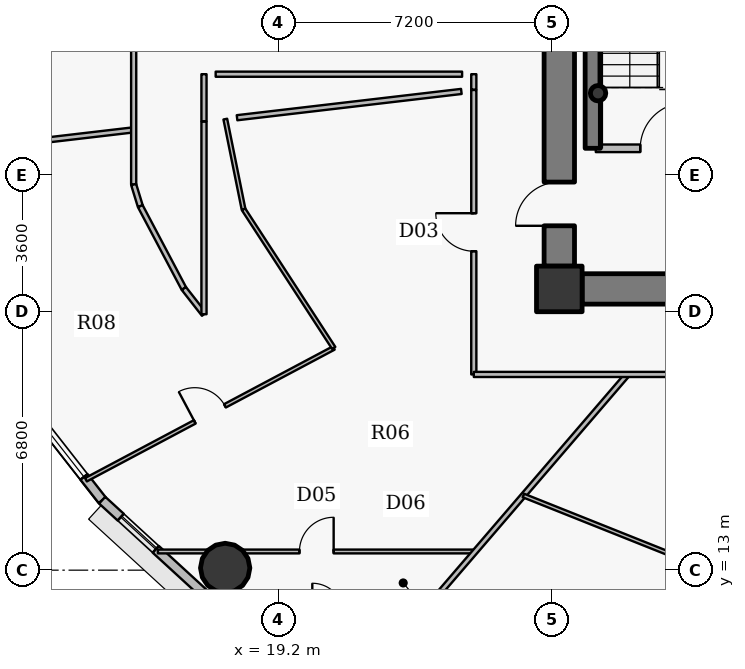
"""IFC4 building model, lengths in metres.
Left out: names, types, materials, properties, quantities, classifications, styles, units other than length and angle.
Written with IfcOpenShell. Run it as: python <this file> out.ifc"""

import sys

from ifc_helpers import new_model, si_unit, direction, frame, frame_2d, origin, origin_2d, place, context, subcontext, project, spatial, rectangle, hollow_circle, extrude, source, transform, mapped, element, fill, save


model = new_model("IFC4")
c1 = context("Model", 3, precision=1e-05, world=origin(), true_north=direction((0.0, 1.0)))
c2 = subcontext(c1, "Body", "Model", "MODEL_VIEW")
j1 = project(units=[si_unit("LENGTHUNIT", "METRE"), si_unit("PLANEANGLEUNIT", "RADIAN")], contexts=[c1])
p1 = place(None, origin())
s1 = spatial("IfcSite", under=j1, at=p1, CompositionType="ELEMENT")
p2 = place(p1, origin())
s2 = spatial("IfcBuilding", under=s1, at=p2, CompositionType="ELEMENT")
p3 = place(p2, frame((0.0, 0.0, 182.4)))
s3 = spatial("IfcBuildingStorey", under=s2, at=p3, CompositionType="ELEMENT", Elevation=182.4)
p4 = place(p3, frame((26.6, 20.4, 0.0), z_axis=(0.0, 0.0, 1.0), x_axis=(1.0, 0.0, 0.0)))
e1 = element("IfcColumn", 1, at=p4, inside=s3, PredefinedType="COLUMN", context=c2, shape_type="SweptSolid", body=[
    extrude(rectangle(XDim=1.2, YDim=1.2, at=origin_2d()), origin(), (0.0, 0.0, 1.0), 3.75),
])
p5 = place(p3, frame((27.48, 24.1, 0.0), z_axis=(0.0, 0.0, 1.0), x_axis=(0.0, 1.0, 0.0)))
e2 = element("IfcWall", 2, at=p5, inside=s3, PredefinedType="SHEAR", context=c2, shape_type="SweptSolid", body=[
    extrude(rectangle(XDim=8.6, YDim=0.4, at=frame_2d((4.3, 0.0))), origin(), (0.0, 0.0, 1.0), 3.75),
])
p6 = place(p3, frame((27.62, 25.55, 0.0), z_axis=(0.0, 0.0, 1.0), x_axis=(1.0, 0.0, 0.0)))
e3 = element("IfcColumn", 3, at=p6, inside=s3, PredefinedType="COLUMN", context=c2, shape_type="SweptSolid", body=[
    extrude(hollow_circle(Radius=0.203, WallThickness=0.016, at=origin_2d()), origin(), (0.0, 0.0, 1.0), 3.75),
])
p7 = place(p3, frame((44.8, 20.4, 0.0), z_axis=(0.0, 0.0, 1.0), x_axis=(-1.0, 0.0, 0.0)))
e4 = element("IfcWall", 4, at=p7, inside=s3, PredefinedType="SHEAR", context=c2, shape_type="SweptSolid", body=[
    extrude(rectangle(XDim=17.6, YDim=0.8, at=frame_2d((8.8, 0.0))), origin(), (0.0, 0.0, 1.0), 2.95),
])
p8 = place(p7, frame((9.55, 0.0, 0.0)))
e5 = element("IfcOpeningElement", 5, at=p8, cuts=e4, PredefinedType="OPENING", context=c2, shape_type="SweptSolid", body=[
    extrude(rectangle(XDim=1.15, YDim=2.15, at=origin_2d()), frame((0.575, 0.41, 1.075), z_axis=(0.0, -1.0, 0.0), x_axis=(1.0, 0.0, 0.0)), (0.0, 0.0, 1.0), 0.82),
])
p9 = place(p3, frame((26.6, 21.0, 0.0), z_axis=(0.0, 0.0, 1.0), x_axis=(0.0, 1.0, 0.0)))
e6 = element("IfcWall", 6, at=p9, inside=s3, PredefinedType="SHEAR", context=c2, shape_type="SweptSolid", body=[
    extrude(rectangle(XDim=12.0, YDim=0.8, at=frame_2d((6.0, 0.0))), origin(), (0.0, 0.0, 1.0), 2.95),
])
p10 = place(p9, frame((1.061, 0.0, 0.0)))
e7 = element("IfcOpeningElement", 7, at=p10, cuts=e6, PredefinedType="OPENING", context=c2, shape_type="SweptSolid", body=[
    extrude(rectangle(XDim=1.15, YDim=2.15, at=origin_2d()), frame((0.575, 0.41, 1.075), z_axis=(0.0, -1.0, 0.0), x_axis=(1.0, 0.0, 0.0)), (0.0, 0.0, 1.0), 0.82),
])
p11 = place(p3, frame((17.808, 13.058, 0.0), z_axis=(0.0, 0.0, 1.0), x_axis=(1.0, 0.0, 0.0)))
e8 = element("IfcColumn", 8, at=p11, inside=s3, PredefinedType="COLUMN", context=c2, shape_type="SweptSolid", body=[
    extrude(hollow_circle(Radius=0.65, WallThickness=0.04, at=origin_2d()), origin(), (0.0, 0.0, 1.0), 3.75),
])
p12 = place(p3, frame((14.572, 14.842, 0.0), z_axis=(0.0, 0.0, 1.0), x_axis=(-0.616287674549, 0.787521112224, 0.0)))
e9 = element("IfcWall", 9, at=p12, inside=s3, PredefinedType="SOLIDWALL", context=c2, shape_type="SweptSolid", body=[
    extrude(rectangle(XDim=3.517, YDim=0.24, at=frame_2d((1.759, 0.0))), origin(), (0.0, 0.0, 1.0), 3.5),
])
p13 = place(p12, frame((0.779, 0.0, 0.9)))
e10 = element("IfcOpeningElement", 10, at=p13, cuts=e9, PredefinedType="OPENING", context=c2, shape_type="SweptSolid", body=[
    extrude(rectangle(XDim=2.0, YDim=1.75, at=origin_2d()), frame((1.0, 0.13, 0.875), z_axis=(0.0, -1.0, 0.0), x_axis=(1.0, 0.0, 0.0)), (0.0, 0.0, 1.0), 0.26),
])
p14 = place(p3, frame((17.268, 12.369, 0.0), z_axis=(0.0, 0.0, 1.0), x_axis=(-0.737076565834, 0.675809245349, 0.0)))
e11 = element("IfcWall", 11, at=p14, inside=s3, PredefinedType="SOLIDWALL", context=c2, shape_type="SweptSolid", body=[
    extrude(rectangle(XDim=3.658, YDim=0.24, at=frame_2d((1.829, 0.0))), origin(), (0.0, 0.0, 1.0), 3.5),
])
p15 = place(p14, frame((1.746, 0.0, 0.9)))
e12 = element("IfcOpeningElement", 12, at=p15, cuts=e11, PredefinedType="OPENING", context=c2, shape_type="SweptSolid", body=[
    extrude(rectangle(XDim=1.25, YDim=1.65, at=origin_2d()), frame((0.625, 0.13, 0.825), z_axis=(0.0, -1.0, 0.0), x_axis=(1.0, 0.0, 0.0)), (0.0, 0.0, 1.0), 0.26),
])
p16 = place(p3, frame((9.828, 23.933, 0.0), z_axis=(0.0, 0.0, 1.0), x_axis=(0.993205157511, 0.116376608877, 0.0)))
e13 = element("IfcWall", 13, at=p16, inside=s3, PredefinedType="PARTITIONING", context=c2, shape_type="SweptSolid", body=[
    extrude(rectangle(XDim=5.61, YDim=0.135, at=frame_2d((2.805, 0.0))), origin(), (0.0, 0.0, 1.0), 2.935),
])
p17 = place(p3, frame((14.145, 15.379, 0.0), z_axis=(0.0, 0.0, 1.0), x_axis=(0.882946160832, 0.469474256027, 0.0)))
e14 = element("IfcWall", 14, at=p17, inside=s3, PredefinedType="PARTITIONING", context=c2, shape_type="SweptSolid", body=[
    extrude(rectangle(XDim=7.385, YDim=0.1, at=frame_2d((3.692, 0.0))), origin(), (0.0, 0.0, 1.0), 2.935),
])
p18 = place(p17, frame((3.242, 0.0, 0.0)))
e15 = element("IfcOpeningElement", 15, at=p18, cuts=e14, PredefinedType="OPENING", context=c2, shape_type="SweptSolid", body=[
    extrude(rectangle(XDim=0.9, YDim=2.1, at=origin_2d()), frame((0.45, 0.06, 1.05), z_axis=(0.0, -1.0, 0.0), x_axis=(1.0, 0.0, 0.0)), (0.0, 0.0, 1.0), 0.12),
])
p19 = place(p3, frame((15.4, 23.146, 0.0), z_axis=(0.0, 0.0, 1.0), x_axis=(0.0, 1.0, 0.0)))
e16 = element("IfcWall", 16, at=p19, inside=s3, PredefinedType="PARTITIONING", context=c2, shape_type="SweptSolid", body=[
    extrude(rectangle(XDim=4.804, YDim=0.135, at=frame_2d((2.402, 0.0))), origin(), (0.0, 0.0, 1.0), 2.935),
])
p20 = place(p3, frame((15.4, 23.146, 0.0), z_axis=(0.0, 0.0, 1.0), x_axis=(0.293335154151, -0.956009669061, 0.0)))
e17 = element("IfcWall", 17, at=p20, inside=s3, PredefinedType="PARTITIONING", context=c2, shape_type="SweptSolid", body=[
    extrude(rectangle(XDim=0.594, YDim=0.135, at=frame_2d((0.297, 0.0))), origin(), (0.0, 0.0, 1.0), 3.5),
])
p21 = place(p3, frame((15.574, 22.578, 0.0), z_axis=(0.0, 0.0, 1.0), x_axis=(0.46757196543, -0.883955008552, 0.0)))
e18 = element("IfcWall", 18, at=p21, inside=s3, PredefinedType="PARTITIONING", context=c2, shape_type="SweptSolid", body=[
    extrude(rectangle(XDim=2.451, YDim=0.135, at=frame_2d((1.226, 0.0))), origin(), (0.0, 0.0, 1.0), 2.935),
])
p22 = place(p3, frame((16.037, 13.491, 0.0), z_axis=(0.0, 0.0, 1.0), x_axis=(1.0, 0.0, 0.0)))
e19 = element("IfcWall", 19, at=p22, inside=s3, PredefinedType="PARTITIONING", context=c2, shape_type="SweptSolid", body=[
    extrude(rectangle(XDim=8.35, YDim=0.1, at=frame_2d((4.175, 0.0))), origin(), (0.0, 0.0, 1.0), 2.935),
])
p23 = place(p22, frame((3.725, 0.0, 0.0)))
e20 = element("IfcOpeningElement", 20, at=p23, cuts=e19, PredefinedType="OPENING", context=c2, shape_type="SweptSolid", body=[
    extrude(rectangle(XDim=0.9, YDim=2.1, at=origin_2d()), frame((0.45, 0.06, 1.05), z_axis=(0.0, -1.0, 0.0), x_axis=(1.0, 0.0, 0.0)), (0.0, 0.0, 1.0), 0.12),
])
p24 = place(p3, frame((16.72, 20.411, 0.0), z_axis=(0.0, 0.0, 1.0), x_axis=(0.616377221056, -0.787451027914, 0.0)))
e21 = element("IfcWall", 21, at=p24, inside=s3, PredefinedType="PARTITIONING", context=c2, shape_type="SweptSolid", body=[
    extrude(rectangle(XDim=0.859, YDim=0.135, at=frame_2d((0.43, 0.0))), origin(), (0.0, 0.0, 1.0), 3.5),
])
p25 = place(p3, frame((17.25, 19.734, 0.0), z_axis=(0.0, 0.0, 1.0), x_axis=(0.0, 1.0, 0.0)))
e22 = element("IfcWall", 22, at=p25, inside=s3, PredefinedType="PARTITIONING", context=c2, shape_type="SweptSolid", body=[
    extrude(rectangle(XDim=5.068, YDim=0.135, at=frame_2d((2.534, 0.0))), origin(), (0.0, 0.0, 1.0), 2.935),
])
p26 = place(p3, frame((17.811, 24.868, 0.0), z_axis=(0.0, 0.0, 1.0), x_axis=(0.198247700743, -0.980151952072, 0.0)))
e23 = element("IfcWall", 23, at=p26, inside=s3, PredefinedType="PARTITIONING", context=c2, shape_type="SweptSolid", body=[
    extrude(rectangle(XDim=2.422, YDim=0.1, at=frame_2d((1.211, 0.0))), origin(), (0.0, 0.0, 1.0), 2.935),
])
p27 = place(p3, frame((18.291, 22.494, 0.0), z_axis=(0.0, 0.0, 1.0), x_axis=(0.545410225271, -0.838169246734, 0.0)))
e24 = element("IfcWall", 24, at=p27, inside=s3, PredefinedType="PARTITIONING", context=c2, shape_type="SweptSolid", body=[
    extrude(rectangle(XDim=4.352, YDim=0.1, at=frame_2d((2.176, 0.0))), origin(), (0.0, 0.0, 1.0), 2.935),
])
p28 = place(p3, frame((21.259, 9.852, 0.0), z_axis=(0.0, 0.0, 1.0), x_axis=(0.651889454341, 0.758314011026, 0.0)))
e25 = element("IfcWall", 25, at=p28, inside=s3, PredefinedType="PARTITIONING", context=c2, shape_type="SweptSolid", body=[
    extrude(rectangle(XDim=10.942, YDim=0.135, at=frame_2d((5.471, 0.0))), origin(), (0.0, 0.0, 1.0), 2.935),
])
p29 = place(p3, frame((24.35, 18.15, 0.0), z_axis=(0.0, 0.0, 1.0), x_axis=(0.0, 1.0, 0.0)))
e26 = element("IfcWall", 26, at=p29, inside=s3, PredefinedType="PARTITIONING", context=c2, shape_type="SweptSolid", body=[
    extrude(rectangle(XDim=7.485, YDim=0.135, at=frame_2d((3.742, 0.0))), origin(), (0.0, 0.0, 1.0), 2.935),
])
p30 = place(p29, frame((3.242, 0.0, 0.0)))
e27 = element("IfcOpeningElement", 27, at=p30, cuts=e26, PredefinedType="OPENING", context=c2, shape_type="SweptSolid", body=[
    extrude(rectangle(XDim=1.0, YDim=2.15, at=origin_2d()), frame((0.5, 0.078, 1.075), z_axis=(0.0, -1.0, 0.0), x_axis=(1.0, 0.0, 0.0)), (0.0, 0.0, 1.0), 0.155),
])
p31 = place(p3, frame((24.35, 18.15, 0.0), z_axis=(0.0, 0.0, 1.0), x_axis=(1.0, 0.0, 0.0)))
e28 = element("IfcWall", 28, at=p31, inside=s3, PredefinedType="PARTITIONING", context=c2, shape_type="SweptSolid", body=[
    extrude(rectangle(XDim=11.341, YDim=0.135, at=frame_2d((5.67, 0.0))), origin(), (0.0, 0.0, 1.0), 2.935),
])
p32 = place(p31, frame((7.171, 0.0, 0.0)))
e29 = element("IfcOpeningElement", 29, at=p32, cuts=e28, PredefinedType="OPENING", context=c2, shape_type="SweptSolid", body=[
    extrude(rectangle(XDim=1.0, YDim=2.15, at=origin_2d()), frame((0.5, 0.078, 1.075), z_axis=(0.0, -1.0, 0.0), x_axis=(1.0, 0.0, 0.0)), (0.0, 0.0, 1.0), 0.155),
])
p33 = place(p3, frame((25.654, 14.965, 0.0), z_axis=(0.0, 0.0, 1.0), x_axis=(0.928793067963, -0.370598754589, 0.0)))
e30 = element("IfcWall", 30, at=p33, inside=s3, PredefinedType="PARTITIONING", context=c2, shape_type="SweptSolid", body=[
    extrude(rectangle(XDim=4.944, YDim=0.1, at=frame_2d((2.472, 0.0))), origin(), (0.0, 0.0, 1.0), 2.935),
])
p34 = place(p3, frame((27.56, 24.1, 0.0), z_axis=(0.0, 0.0, 1.0), x_axis=(1.0, 0.0, 0.0)))
e31 = element("IfcWall", 31, at=p34, inside=s3, PredefinedType="PARTITIONING", context=c2, shape_type="SweptSolid", body=[
    extrude(rectangle(XDim=3.54, YDim=0.2, at=frame_2d((1.77, 0.0))), origin(), (0.0, 0.0, 1.0), 3.5),
])
p35 = place(p34, frame((1.17, 0.0, 0.0)))
e32 = element("IfcOpeningElement", 32, at=p35, cuts=e31, PredefinedType="OPENING", context=c2, shape_type="SweptSolid", body=[
    extrude(rectangle(XDim=1.2, YDim=2.15, at=origin_2d()), frame((0.6, 0.11, 1.075), z_axis=(0.0, -1.0, 0.0), x_axis=(1.0, 0.0, 0.0)), (0.0, 0.0, 1.0), 0.22),
])
p36 = place(p3, frame((28.271, 7.219, 0.0), z_axis=(0.0, 0.0, 1.0), x_axis=(0.363936593544, 0.931423725207, 0.0)))
e33 = element("IfcWall", 33, at=p36, inside=s3, PredefinedType="PARTITIONING", context=c2, shape_type="SweptSolid", body=[
    extrude(rectangle(XDim=6.306, YDim=0.1, at=frame_2d((3.153, 0.0))), origin(), (0.0, 0.0, 1.0), 2.935),
])
p37 = place(p36, frame((2.703, 0.0, 0.0)))
e34 = element("IfcOpeningElement", 34, at=p37, cuts=e33, PredefinedType="OPENING", context=c2, shape_type="SweptSolid", body=[
    extrude(rectangle(XDim=0.9, YDim=2.1, at=origin_2d()), frame((0.45, 0.06, 1.05), z_axis=(0.0, -1.0, 0.0), x_axis=(1.0, 0.0, 0.0)), (0.0, 0.0, 1.0), 0.12),
])
p38 = place(p3, frame((17.25, 26.05, 0.0), z_axis=(0.0, 0.0, 1.0), x_axis=(0.0, -1.0, 0.0)))
e35 = element("IfcWall", 35, at=p38, inside=s3, PredefinedType="PARTITIONING", context=c2, shape_type="SweptSolid", body=[
    extrude(rectangle(XDim=1.238, YDim=0.135, at=frame_2d((0.619, 0.0))), origin(), (0.0, 0.0, 1.0), 3.085),
])
p39 = place(p3, frame((26.2, 20.99, 0.0), z_axis=(0.0, 0.0, 1.0), x_axis=(0.0, -1.0, 0.0)))
e36 = element("IfcWall", 36, at=p39, inside=s3, PredefinedType="PARTITIONING", context=c2, shape_type="SweptSolid", body=[
    extrude(rectangle(XDim=0.99, YDim=0.135, at=frame_2d((0.495, 0.0))), origin(), (0.0, 0.0, 1.0), 3.5),
])
p40 = place(p3, frame((26.508, 20.0, 0.0), z_axis=(0.0, 0.0, 1.0), x_axis=(1.0, 0.0, 0.0)))
e37 = element("IfcWall", 37, at=p40, inside=s3, PredefinedType="PARTITIONING", context=c2, shape_type="SweptSolid", body=[
    extrude(rectangle(XDim=0.682, YDim=0.135, at=frame_2d((0.341, 0.0))), origin(), (0.0, 0.0, 1.0), 2.935),
])
p41 = place(p3, frame((24.35, 25.645, 0.0), z_axis=(0.0, 0.0, 1.0), x_axis=(0.0, 1.0, 0.0)))
e38 = element("IfcWall", 38, at=p41, inside=s3, PredefinedType="PARTITIONING", context=c2, shape_type="SweptSolid", body=[
    extrude(rectangle(XDim=0.405, YDim=0.135, at=frame_2d((0.203, 0.0))), origin(), (0.0, 0.0, 1.0), 3.5),
])
p42 = place(p3, frame((24.042, 26.05, 0.0), z_axis=(0.0, 0.0, 1.0), x_axis=(-1.0, 0.0, 0.0)))
e39 = element("IfcWall", 39, at=p42, inside=s3, PredefinedType="PARTITIONING", context=c2, shape_type="SweptSolid", body=[
    extrude(rectangle(XDim=6.485, YDim=0.135, at=frame_2d((3.242, 0.0))), origin(), (0.0, 0.0, 1.0), 3.5),
])
p43 = place(p3, frame((18.12, 24.905, 0.0), z_axis=(0.0, 0.0, 1.0), x_axis=(0.993204061109, 0.116385965632, 0.0)))
e40 = element("IfcWall", 40, at=p43, inside=s3, PredefinedType="PARTITIONING", context=c2, shape_type="SweptSolid", body=[
    extrude(rectangle(XDim=5.943, YDim=0.135, at=frame_2d((2.971, 0.0))), origin(), (0.0, 0.0, 1.0), 3.5),
])
m1 = source(origin(), c2, "Body", "SweptSolid", [
    extrude(rectangle(XDim=2.0, YDim=1.75, at=origin_2d()), frame((1.0, 0.03, 0.875), z_axis=(0.0, -1.0, 0.0), x_axis=(1.0, 0.0, 0.0)), (0.0, 0.0, 1.0), 0.06),
])
p44 = place(p13, origin())
e41 = element("IfcWindow", 41, at=p44, inside=s3, PartitioningType="DOUBLE_PANEL_VERTICAL", PredefinedType="WINDOW", context=c2, shape_type="MappedRepresentation", body=[
    mapped(m1, transform((0.0, 0.0, 0.0), x_axis=(1.0, 0.0, 0.0), y_axis=(0.0, 1.0, 0.0), z_axis=(0.0, 0.0, 1.0), scale=1.0)),
])
fill(e10, e41)
m2 = source(origin(), c2, "Body", "SweptSolid", [
    extrude(rectangle(XDim=1.25, YDim=1.65, at=origin_2d()), frame((0.625, 0.03, 0.825), z_axis=(0.0, -1.0, 0.0), x_axis=(1.0, 0.0, 0.0)), (0.0, 0.0, 1.0), 0.06),
])
p45 = place(p15, origin())
e42 = element("IfcWindow", 42, at=p45, inside=s3, PartitioningType="SINGLE_PANEL", PredefinedType="WINDOW", context=c2, shape_type="MappedRepresentation", body=[
    mapped(m2, transform((0.0, 0.0, 0.0), x_axis=(1.0, 0.0, 0.0), y_axis=(0.0, 1.0, 0.0), z_axis=(0.0, 0.0, 1.0), scale=1.0)),
])
fill(e12, e42)
m3 = source(origin(), c2, "Body", "SweptSolid", [
    extrude(rectangle(XDim=1.15, YDim=2.15, at=origin_2d()), frame((0.575, 0.025, 1.075), z_axis=(0.0, -1.0, 0.0), x_axis=(1.0, 0.0, 0.0)), (0.0, 0.0, 1.0), 0.05),
])
p46 = place(p10, origin())
e43 = element("IfcDoor", 43, at=p46, inside=s3, OperationType="SINGLE_SWING_LEFT", PredefinedType="DOOR", context=c2, shape_type="MappedRepresentation", body=[
    mapped(m3, transform((0.0, 0.0, 0.0), x_axis=(1.0, 0.0, 0.0), y_axis=(0.0, 1.0, 0.0), z_axis=(0.0, 0.0, 1.0), scale=1.0)),
])
fill(e7, e43)
m4 = source(origin(), c2, "Body", "SweptSolid", [
    extrude(rectangle(XDim=1.2, YDim=2.15, at=origin_2d()), frame((0.6, 0.025, 1.075), z_axis=(0.0, -1.0, 0.0), x_axis=(1.0, 0.0, 0.0)), (0.0, 0.0, 1.0), 0.05),
])
p47 = place(p35, origin())
e44 = element("IfcDoor", 44, at=p47, inside=s3, OperationType="SINGLE_SWING_RIGHT", PredefinedType="DOOR", context=c2, shape_type="MappedRepresentation", body=[
    mapped(m4, transform((0.0, 0.0, 0.0), x_axis=(1.0, 0.0, 0.0), y_axis=(0.0, 1.0, 0.0), z_axis=(0.0, 0.0, 1.0), scale=1.0)),
])
fill(e32, e44)
m5 = source(origin(), c2, "Body", "SweptSolid", [
    extrude(rectangle(XDim=1.0, YDim=2.15, at=origin_2d()), frame((0.5, 0.025, 1.075), z_axis=(0.0, -1.0, 0.0), x_axis=(1.0, 0.0, 0.0)), (0.0, 0.0, 1.0), 0.05),
])
p48 = place(p30, origin())
e45 = element("IfcDoor", 45, at=p48, inside=s3, OperationType="SINGLE_SWING_RIGHT", PredefinedType="DOOR", context=c2, shape_type="MappedRepresentation", body=[
    mapped(m5, transform((0.0, 0.0, 0.0), x_axis=(1.0, 0.0, 0.0), y_axis=(0.0, 1.0, 0.0), z_axis=(0.0, 0.0, 1.0), scale=1.0)),
])
fill(e27, e45)
m6 = source(origin(), c2, "Body", "SweptSolid", [
    extrude(rectangle(XDim=0.9, YDim=2.1, at=origin_2d()), frame((0.45, 0.025, 1.05), z_axis=(0.0, -1.0, 0.0), x_axis=(1.0, 0.0, 0.0)), (0.0, 0.0, 1.0), 0.05),
])
p49 = place(p18, origin())
e46 = element("IfcDoor", 46, at=p49, inside=s3, OperationType="SINGLE_SWING_LEFT", PredefinedType="DOOR", context=c2, shape_type="MappedRepresentation", body=[
    mapped(m6, transform((0.0, 0.0, 0.0), x_axis=(1.0, 0.0, 0.0), y_axis=(0.0, 1.0, 0.0), z_axis=(0.0, 0.0, 1.0), scale=1.0)),
])
fill(e15, e46)
p50 = place(p23, origin())
e47 = element("IfcDoor", 47, at=p50, inside=s3, OperationType="SINGLE_SWING_RIGHT", PredefinedType="DOOR", context=c2, shape_type="MappedRepresentation", body=[
    mapped(m6, transform((0.0, 0.0, 0.0), x_axis=(1.0, 0.0, 0.0), y_axis=(0.0, 1.0, 0.0), z_axis=(0.0, 0.0, 1.0), scale=1.0)),
])
fill(e20, e47)
save(model, sys.argv[1])
